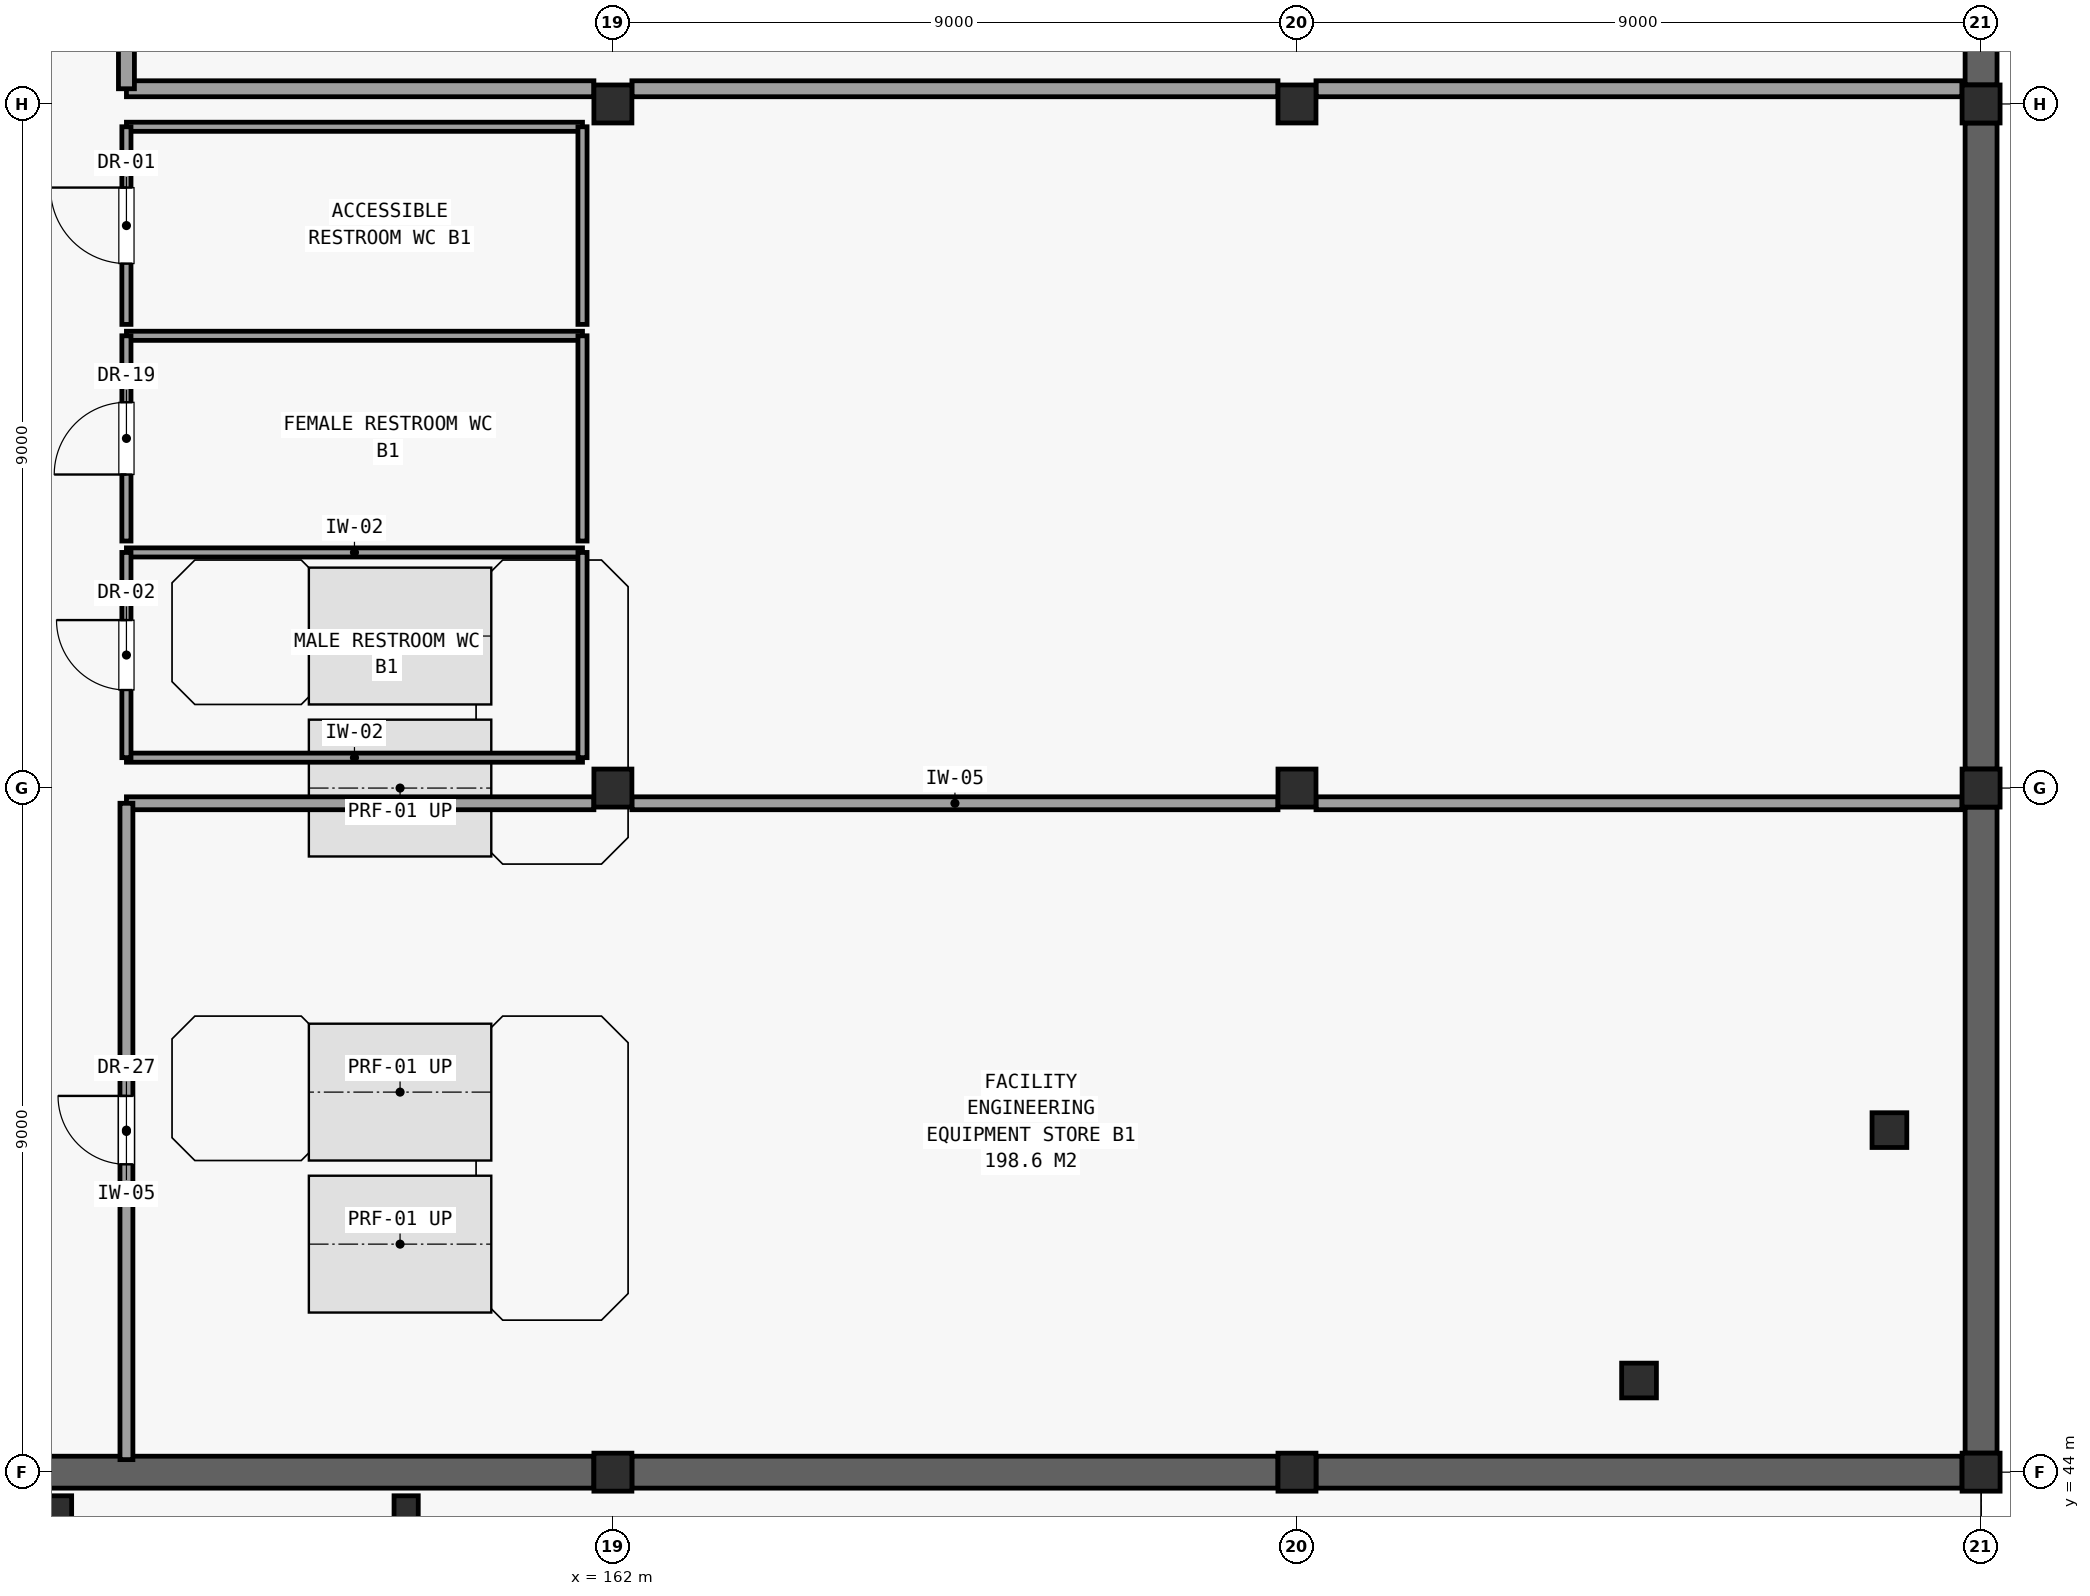
"""IFC4 building model, lengths in metres.
Left out: names, types, materials, properties, quantities, classifications, styles, units other than length and angle.
Written with IfcOpenShell. Run it as: python <this file> out.ifc"""

import sys

from ifc_helpers import new_model, si_unit, direction, frame, frame_2d, origin, origin_2d, place, context, subcontext, project, spatial, rectangle, hollow_rectangle, hollow_circle, extrude, element, fill, save


model = new_model("IFC4")
c1 = context("Model", 3, precision=1e-05, world=origin(), true_north=direction((0.0, 1.0)))
c2 = subcontext(c1, "Body", "Model", "MODEL_VIEW")
j1 = project(units=[si_unit("LENGTHUNIT", "METRE"), si_unit("PLANEANGLEUNIT", "RADIAN")], contexts=[c1])
p1 = place(None, origin())
s1 = spatial("IfcSite", under=j1, at=p1, CompositionType="ELEMENT")
p2 = place(p1, origin())
s2 = spatial("IfcBuilding", under=s1, at=p2, CompositionType="ELEMENT")
p3 = place(p2, frame((0.0, 0.0, -4.8)))
s3 = spatial("IfcBuildingStorey", under=s2, at=p3, CompositionType="ELEMENT", Elevation=-4.8)
for number, where, z_axis, x_axis in (
    (1, (154.72, 43.53, 0.0), (0.0, 0.0, 1.0), (1.0, 0.0, 0.0)),
    (2, (159.28, 43.53, 0.0), (0.0, 0.0, 1.0), (1.0, 0.0, 0.0)),
):
    element("IfcColumn", number, at=place(p3, frame(where, z_axis=z_axis, x_axis=x_axis)), inside=s3, PredefinedType="COLUMN", context=c2, shape_type="SweptSolid", body=[
        extrude(hollow_circle(Radius=0.159, WallThickness=0.01, at=origin_2d()), origin(), (0.0, 0.0, 1.0), 4.8),
    ])
for number, where, z_axis, x_axis in (
    (3, (162.0, 44.0, 0.0), (0.0, 0.0, 1.0), (1.0, 0.0, 0.0)),
    (4, (162.0, 53.0, 0.0), (0.0, 0.0, 1.0), (1.0, 0.0, 0.0)),
    (5, (162.0, 62.0, 0.0), (0.0, 0.0, 1.0), (1.0, 0.0, 0.0)),
    (6, (171.0, 44.0, 0.0), (0.0, 0.0, 1.0), (1.0, 0.0, 0.0)),
    (7, (171.0, 53.0, 0.0), (0.0, 0.0, 1.0), (1.0, 0.0, 0.0)),
    (8, (171.0, 62.0, 0.0), (0.0, 0.0, 1.0), (1.0, 0.0, 0.0)),
):
    element("IfcColumn", number, at=place(p3, frame(where, z_axis=z_axis, x_axis=x_axis)), inside=s3, PredefinedType="COLUMN", context=c2, shape_type="SweptSolid", body=[
        extrude(hollow_rectangle(XDim=0.5, YDim=0.5, WallThickness=0.025, at=origin_2d()), origin(), (0.0, 0.0, 1.0), 4.8),
    ])
for number, where, z_axis, x_axis in (
    (9, (175.5, 45.206, 0.0), (0.0, 0.0, 1.0), (1.0, 0.0, 0.0)),
    (10, (178.794, 48.5, 0.0), (0.0, 0.0, 1.0), (1.0, 0.0, 0.0)),
):
    element("IfcColumn", number, at=place(p3, frame(where, z_axis=z_axis, x_axis=x_axis)), inside=s3, PredefinedType="COLUMN", context=c2, shape_type="SweptSolid", body=[
        extrude(hollow_circle(Radius=0.229, WallThickness=0.016, at=origin_2d()), origin(), (0.0, 0.0, 1.0), 4.8),
    ])
for number, where, z_axis, x_axis in (
    (11, (180.0, 44.0, 0.0), (0.0, 0.0, 1.0), (1.0, 0.0, 0.0)),
    (12, (180.0, 53.0, 0.0), (0.0, 0.0, 1.0), (1.0, 0.0, 0.0)),
    (13, (180.0, 62.0, 0.0), (0.0, 0.0, 1.0), (1.0, 0.0, 0.0)),
):
    element("IfcColumn", number, at=place(p3, frame(where, z_axis=z_axis, x_axis=x_axis)), inside=s3, PredefinedType="COLUMN", context=c2, shape_type="SweptSolid", body=[
        extrude(hollow_rectangle(XDim=0.5, YDim=0.5, WallThickness=0.025, at=origin_2d()), origin(), (0.0, 0.0, 1.0), 4.8),
    ])
for number, where, z_axis, x_axis in (
    (14, (153.25, 44.0, 0.0), (0.0, 0.0, 1.0), (1.0, 0.0, 0.0)),
    (15, (162.25, 44.0, 0.0), (0.0, 0.0, 1.0), (1.0, 0.0, 0.0)),
    (16, (171.25, 44.0, 0.0), (0.0, 0.0, 1.0), (1.0, 0.0, 0.0)),
):
    element("IfcWall", number, at=place(p3, frame(where, z_axis=z_axis, x_axis=x_axis)), inside=s3, PredefinedType="USERDEFINED", context=c2, shape_type="SweptSolid", body=[
        extrude(rectangle(XDim=8.5, YDim=0.42, at=frame_2d((4.25, 0.0))), origin(), (0.0, 0.0, 1.0), 4.13),
    ])
for number, where, z_axis, x_axis in (
    (17, (180.0, 44.25, 0.0), (0.0, 0.0, 1.0), (0.0, 1.0, 0.0)),
    (18, (180.0, 53.25, 0.0), (0.0, 0.0, 1.0), (0.0, 1.0, 0.0)),
    (19, (180.0, 62.25, 0.0), (0.0, 0.0, 1.0), (0.0, 1.0, 0.0)),
):
    element("IfcWall", number, at=place(p3, frame(where, z_axis=z_axis, x_axis=x_axis)), inside=s3, PredefinedType="USERDEFINED", context=c2, shape_type="SweptSolid", body=[
        extrude(rectangle(XDim=8.5, YDim=0.42, at=frame_2d((4.25, 0.0))), origin(), (0.0, 0.0, 1.0), 3.72),
    ])
for number, where, z_axis, x_axis in (
    (20, (155.6, 53.4, 0.0), (0.0, 0.0, 1.0), (1.0, 0.0, 0.0)),
    (21, (155.6, 56.1, 0.0), (0.0, 0.0, 1.0), (1.0, 0.0, 0.0)),
):
    element("IfcWall", number, at=place(p3, frame(where, z_axis=z_axis, x_axis=x_axis)), inside=s3, PredefinedType="PARTITIONING", context=c2, shape_type="SweptSolid", body=[
        extrude(rectangle(XDim=6.0, YDim=0.12, at=frame_2d((3.0, 0.0))), origin(), (0.0, 0.0, 1.0), 4.52),
    ])
p4 = place(p3, frame((155.6, 53.4, 0.0), z_axis=(0.0, 0.0, 1.0), x_axis=(0.0, 1.0, 0.0)))
e22 = element("IfcWall", 22, at=p4, inside=s3, PredefinedType="PARTITIONING", context=c2, shape_type="SweptSolid", body=[
    extrude(rectangle(XDim=2.7, YDim=0.12, at=frame_2d((1.35, 0.0))), origin(), (0.0, 0.0, 1.0), 4.52),
])
p5 = place(p4, frame((0.89, 0.0, 0.0)))
e23 = element("IfcOpeningElement", 23, at=p5, cuts=e22, PredefinedType="OPENING", context=c2, shape_type="SweptSolid", body=[
    extrude(rectangle(XDim=0.92, YDim=2.1, at=frame_2d((0.46, 1.05))), frame((0.0, 0.071, 0.0), z_axis=(0.0, -1.0, 0.0), x_axis=(1.0, 0.0, 0.0)), (0.0, 0.0, 1.0), 0.142),
])
p6 = place(p3, frame((161.6, 53.4, 0.0), z_axis=(0.0, 0.0, 1.0), x_axis=(0.0, 1.0, 0.0)))
e24 = element("IfcWall", 24, at=p6, inside=s3, PredefinedType="PARTITIONING", context=c2, shape_type="SweptSolid", body=[
    extrude(rectangle(XDim=2.7, YDim=0.12, at=frame_2d((1.35, 0.0))), origin(), (0.0, 0.0, 1.0), 4.52),
])
p7 = place(p3, frame((155.6, 58.95, 0.0), z_axis=(0.0, 0.0, 1.0), x_axis=(1.0, 0.0, 0.0)))
e25 = element("IfcWall", 25, at=p7, inside=s3, PredefinedType="PARTITIONING", context=c2, shape_type="SweptSolid", body=[
    extrude(rectangle(XDim=6.0, YDim=0.12, at=frame_2d((3.0, 0.0))), origin(), (0.0, 0.0, 1.0), 4.52),
])
p8 = place(p3, frame((155.6, 56.25, 0.0), z_axis=(0.0, 0.0, 1.0), x_axis=(0.0, 1.0, 0.0)))
e26 = element("IfcWall", 26, at=p8, inside=s3, PredefinedType="PARTITIONING", context=c2, shape_type="SweptSolid", body=[
    extrude(rectangle(XDim=2.7, YDim=0.12, at=frame_2d((1.35, 0.0))), origin(), (0.0, 0.0, 1.0), 4.12),
])
p9 = place(p8, frame((0.875, 0.0, 0.0)))
e27 = element("IfcOpeningElement", 27, at=p9, cuts=e26, PredefinedType="OPENING", context=c2, shape_type="SweptSolid", body=[
    extrude(rectangle(XDim=0.95, YDim=2.15, at=frame_2d((0.475, 1.075))), frame((0.0, 0.071, 0.0), z_axis=(0.0, -1.0, 0.0), x_axis=(1.0, 0.0, 0.0)), (0.0, 0.0, 1.0), 0.142),
])
p10 = place(p3, frame((161.6, 56.25, 0.0), z_axis=(0.0, 0.0, 1.0), x_axis=(0.0, 1.0, 0.0)))
e28 = element("IfcWall", 28, at=p10, inside=s3, PredefinedType="PARTITIONING", context=c2, shape_type="SweptSolid", body=[
    extrude(rectangle(XDim=2.7, YDim=0.12, at=frame_2d((1.35, 0.0))), origin(), (0.0, 0.0, 1.0), 4.12),
])
p11 = place(p3, frame((155.6, 61.7, 0.0), z_axis=(0.0, 0.0, 1.0), x_axis=(1.0, 0.0, 0.0)))
e29 = element("IfcWall", 29, at=p11, inside=s3, PredefinedType="PARTITIONING", context=c2, shape_type="SweptSolid", body=[
    extrude(rectangle(XDim=6.0, YDim=0.12, at=frame_2d((3.0, 0.0))), origin(), (0.0, 0.0, 1.0), 3.82),
])
p12 = place(p3, frame((155.6, 59.1, 0.0), z_axis=(0.0, 0.0, 1.0), x_axis=(0.0, 1.0, 0.0)))
e30 = element("IfcWall", 30, at=p12, inside=s3, PredefinedType="PARTITIONING", context=c2, shape_type="SweptSolid", body=[
    extrude(rectangle(XDim=2.6, YDim=0.12, at=frame_2d((1.3, 0.0))), origin(), (0.0, 0.0, 1.0), 3.82),
])
p13 = place(p12, frame((0.8, 0.0, 0.0)))
e31 = element("IfcOpeningElement", 31, at=p13, cuts=e30, PredefinedType="OPENING", context=c2, shape_type="SweptSolid", body=[
    extrude(rectangle(XDim=1.0, YDim=2.15, at=frame_2d((0.5, 1.075))), frame((0.0, 0.071, 0.0), z_axis=(0.0, -1.0, 0.0), x_axis=(1.0, 0.0, 0.0)), (0.0, 0.0, 1.0), 0.142),
])
p14 = place(p3, frame((161.6, 59.1, 0.0), z_axis=(0.0, 0.0, 1.0), x_axis=(0.0, 1.0, 0.0)))
e32 = element("IfcWall", 32, at=p14, inside=s3, PredefinedType="PARTITIONING", context=c2, shape_type="SweptSolid", body=[
    extrude(rectangle(XDim=2.6, YDim=0.12, at=frame_2d((1.3, 0.0))), origin(), (0.0, 0.0, 1.0), 3.82),
])
p15 = place(p3, frame((155.6, 62.2, 0.0), z_axis=(0.0, 0.0, 1.0), x_axis=(1.0, 0.0, 0.0)))
e33 = element("IfcWall", 33, at=p15, inside=s3, PredefinedType="PARTITIONING", context=c2, shape_type="SweptSolid", body=[
    extrude(rectangle(XDim=6.15, YDim=0.21, at=frame_2d((3.075, 0.0))), origin(), (0.0, 0.0, 1.0), 3.72),
])
for number, where, z_axis, x_axis in (
    (34, (162.25, 62.2, 0.0), (0.0, 0.0, 1.0), (1.0, 0.0, 0.0)),
    (35, (171.25, 62.2, 0.0), (0.0, 0.0, 1.0), (1.0, 0.0, 0.0)),
):
    element("IfcWall", number, at=place(p3, frame(where, z_axis=z_axis, x_axis=x_axis)), inside=s3, PredefinedType="PARTITIONING", context=c2, shape_type="SweptSolid", body=[
        extrude(rectangle(XDim=8.5, YDim=0.21, at=frame_2d((4.25, 0.0))), origin(), (0.0, 0.0, 1.0), 3.72),
    ])
p16 = place(p3, frame((155.6, 62.2, 0.0), z_axis=(0.0, 0.0, 1.0), x_axis=(0.0, 1.0, 0.0)))
e36 = element("IfcWall", 36, at=p16, inside=s3, PredefinedType="PARTITIONING", context=c2, shape_type="SweptSolid", body=[
    extrude(rectangle(XDim=17.6, YDim=0.21, at=frame_2d((8.8, 0.0))), origin(), (0.0, 0.0, 1.0), 3.82),
])
p17 = place(p16, frame((12.6, 0.0, 0.0)))
e37 = element("IfcOpeningElement", 37, at=p17, cuts=e36, PredefinedType="OPENING", context=c2, shape_type="SweptSolid", body=[
    extrude(rectangle(XDim=1.4, YDim=2.2, at=frame_2d((0.7, 1.1))), frame((0.0, 0.116, 0.0), z_axis=(0.0, -1.0, 0.0), x_axis=(1.0, 0.0, 0.0)), (0.0, 0.0, 1.0), 0.232),
])
p18 = place(p3, frame((155.6, 52.8, 0.0), z_axis=(0.0, 0.0, 1.0), x_axis=(1.0, 0.0, 0.0)))
e38 = element("IfcWall", 38, at=p18, inside=s3, PredefinedType="PARTITIONING", context=c2, shape_type="SweptSolid", body=[
    extrude(rectangle(XDim=6.15, YDim=0.17, at=frame_2d((3.075, 0.0))), origin(), (0.0, 0.0, 1.0), 3.72),
])
for number, where, z_axis, x_axis in (
    (39, (162.25, 52.8, 0.0), (0.0, 0.0, 1.0), (1.0, 0.0, 0.0)),
    (40, (171.25, 52.8, 0.0), (0.0, 0.0, 1.0), (1.0, 0.0, 0.0)),
):
    element("IfcWall", number, at=place(p3, frame(where, z_axis=z_axis, x_axis=x_axis)), inside=s3, PredefinedType="PARTITIONING", context=c2, shape_type="SweptSolid", body=[
        extrude(rectangle(XDim=8.5, YDim=0.17, at=frame_2d((4.25, 0.0))), origin(), (0.0, 0.0, 1.0), 3.72),
    ])
p19 = place(p3, frame((155.6, 44.165, 0.0), z_axis=(0.0, 0.0, 1.0), x_axis=(0.0, 1.0, 0.0)))
e41 = element("IfcWall", 41, at=p19, inside=s3, PredefinedType="PARTITIONING", context=c2, shape_type="SweptSolid", body=[
    extrude(rectangle(XDim=8.635, YDim=0.17, at=frame_2d((4.317, 0.0))), origin(), (0.0, 0.0, 1.0), 3.82),
])
p20 = place(p19, frame((3.885, 0.0, 0.0)))
e42 = element("IfcOpeningElement", 42, at=p20, cuts=e41, PredefinedType="OPENING", context=c2, shape_type="SweptSolid", body=[
    extrude(rectangle(XDim=0.9, YDim=2.15, at=frame_2d((0.45, 1.075))), frame((0.0, 0.096, 0.0), z_axis=(0.0, -1.0, 0.0), x_axis=(1.0, 0.0, 0.0)), (0.0, 0.0, 1.0), 0.192),
])
p21 = place(p5, origin())
e43 = element("IfcDoor", 43, at=p21, inside=s3, OperationType="SINGLE_SWING_RIGHT", PredefinedType="DOOR", context=c2, shape_type="SweptSolid", body=[
    extrude(rectangle(XDim=0.92, YDim=2.1, at=frame_2d((0.46, 1.05))), frame((0.0, 0.025, 0.0), z_axis=(0.0, -1.0, 0.0), x_axis=(1.0, 0.0, 0.0)), (0.0, 0.0, 1.0), 0.05),
])
fill(e23, e43)
p22 = place(p9, origin())
e44 = element("IfcDoor", 44, at=p22, inside=s3, OperationType="SINGLE_SWING_LEFT", PredefinedType="DOOR", context=c2, shape_type="SweptSolid", body=[
    extrude(rectangle(XDim=0.95, YDim=2.15, at=frame_2d((0.475, 1.075))), frame((0.0, 0.025, 0.0), z_axis=(0.0, -1.0, 0.0), x_axis=(1.0, 0.0, 0.0)), (0.0, 0.0, 1.0), 0.05),
])
fill(e27, e44)
p23 = place(p13, origin())
e45 = element("IfcDoor", 45, at=p23, inside=s3, OperationType="SINGLE_SWING_RIGHT", PredefinedType="DOOR", context=c2, shape_type="SweptSolid", body=[
    extrude(rectangle(XDim=1.0, YDim=2.15, at=frame_2d((0.5, 1.075))), frame((0.0, 0.025, 0.0), z_axis=(0.0, -1.0, 0.0), x_axis=(1.0, 0.0, 0.0)), (0.0, 0.0, 1.0), 0.05),
])
fill(e31, e45)
p24 = place(p20, origin())
e46 = element("IfcDoor", 46, at=p24, inside=s3, OperationType="SINGLE_SWING_RIGHT", PredefinedType="DOOR", context=c2, shape_type="SweptSolid", body=[
    extrude(rectangle(XDim=0.9, YDim=2.15, at=frame_2d((0.45, 1.075))), frame((0.0, 0.025, 0.0), z_axis=(0.0, -1.0, 0.0), x_axis=(1.0, 0.0, 0.0)), (0.0, 0.0, 1.0), 0.05),
])
fill(e42, e46)
save(model, sys.argv[1])
